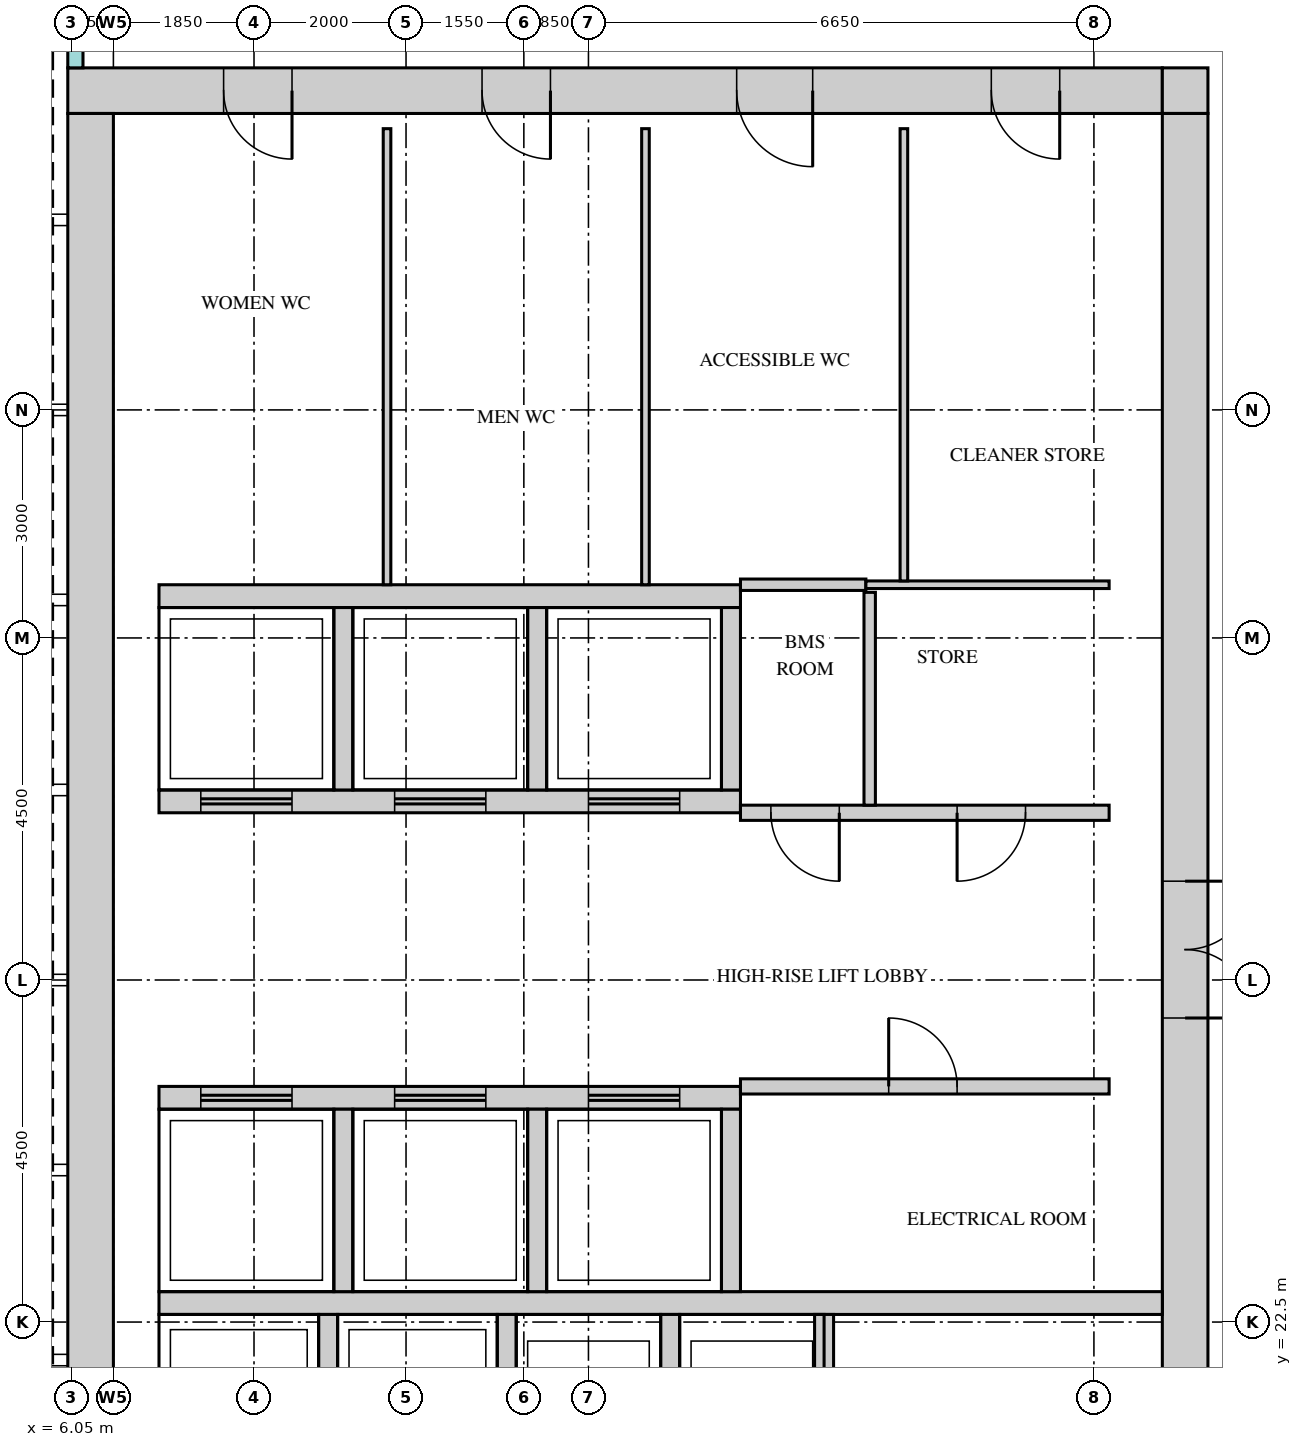
"""IFC4 building model, lengths in metres.
Left out: names, types, materials, properties, quantities, classifications, styles, units other than length and angle.
Written with IfcOpenShell. Run it as: python <this file> out.ifc"""

import sys

from ifc_helpers import new_model, si_unit, direction, frame, frame_2d, origin, place, context, subcontext, project, spatial, rectangle, extrude, source, transform, mapped, element, fill, save


model = new_model("IFC4")
c1 = context("Model", 3, precision=1e-05, world=origin(), true_north=direction((0.0, 1.0)))
c2 = subcontext(c1, "Body", "Model", "MODEL_VIEW")
j1 = project(units=[si_unit("LENGTHUNIT", "METRE"), si_unit("PLANEANGLEUNIT", "RADIAN")], contexts=[c1])
p1 = place(None, origin())
s1 = spatial("IfcSite", under=j1, at=p1, CompositionType="ELEMENT")
p2 = place(p1, origin())
s2 = spatial("IfcBuilding", under=s1, at=p2, CompositionType="ELEMENT")
p3 = place(p2, frame((0.0, 0.0, 318.2)))
s3 = spatial("IfcBuildingStorey", under=s2, at=p3, CompositionType="ELEMENT", Elevation=318.2)
m1 = source(origin(), c2, "Body", "SweptSolid", [
    extrude(rectangle(XDim=14.4, YDim=0.6, at=frame_2d((7.2, 0.0))), origin(), (0.0, 0.0, 1.0), 3.75),
])
p4 = place(p3, frame((6.0, 38.7, 0.0), z_axis=(0.0, 0.0, 1.0), x_axis=(1.0, 0.0, 0.0)))
e1 = element("IfcWall", 1, at=p4, inside=s3, PredefinedType="SHEAR", context=c2, shape_type="MappedRepresentation", body=[
    mapped(m1, transform((0.0, 0.0, 0.0))),
])
m2 = source(origin(), c2, "Body", "SweptSolid", [
    extrude(rectangle(XDim=0.9, YDim=2.1, at=frame_2d((0.45, 1.05))), frame((0.0, 0.31, 0.0), z_axis=(0.0, -1.0, 0.0), x_axis=(1.0, 0.0, 0.0)), (0.0, 0.0, 1.0), 0.62),
])
p5 = place(p4, frame((2.05, 0.0, 0.0)))
e2 = element("IfcOpeningElement", 2, at=p5, cuts=e1, PredefinedType="OPENING", context=c2, shape_type="MappedRepresentation", body=[
    mapped(m2, transform((0.0, 0.0, 0.0))),
])
p6 = place(p4, frame((5.45, 0.0, 0.0)))
e3 = element("IfcOpeningElement", 3, at=p6, cuts=e1, PredefinedType="OPENING", context=c2, shape_type="MappedRepresentation", body=[
    mapped(m2, transform((0.0, 0.0, 0.0))),
])
m3 = source(origin(), c2, "Body", "SweptSolid", [
    extrude(rectangle(XDim=1.0, YDim=2.1, at=frame_2d((0.5, 1.05))), frame((0.0, 0.31, 0.0), z_axis=(0.0, -1.0, 0.0), x_axis=(1.0, 0.0, 0.0)), (0.0, 0.0, 1.0), 0.62),
])
p7 = place(p4, frame((8.8, 0.0, 0.0)))
e4 = element("IfcOpeningElement", 4, at=p7, cuts=e1, PredefinedType="OPENING", context=c2, shape_type="MappedRepresentation", body=[
    mapped(m3, transform((0.0, 0.0, 0.0))),
])
p8 = place(p4, frame((12.15, 0.0, 0.0)))
e5 = element("IfcOpeningElement", 5, at=p8, cuts=e1, PredefinedType="OPENING", context=c2, shape_type="MappedRepresentation", body=[
    mapped(m2, transform((0.0, 0.0, 0.0))),
])
m4 = source(origin(), c2, "Body", "SweptSolid", [
    extrude(rectangle(XDim=0.6, YDim=0.6, at=frame_2d((0.3, 0.0))), origin(), (0.0, 0.0, 1.0), 3.75),
])
p9 = place(p3, frame((20.4, 38.7, 0.0), z_axis=(0.0, 0.0, 1.0), x_axis=(1.0, 0.0, 0.0)))
e6 = element("IfcWall", 6, at=p9, inside=s3, PredefinedType="SHEAR", context=c2, shape_type="MappedRepresentation", body=[
    mapped(m4, transform((0.0, 0.0, 0.0))),
])
m5 = source(origin(), c2, "Body", "SweptSolid", [
    extrude(rectangle(XDim=22.8, YDim=0.6, at=frame_2d((11.4, 0.0))), origin(), (0.0, 0.0, 1.0), 3.75),
])
p10 = place(p3, frame((20.7, 15.6, 0.0), z_axis=(0.0, 0.0, 1.0), x_axis=(0.0, 1.0, 0.0)))
e7 = element("IfcWall", 7, at=p10, inside=s3, PredefinedType="SHEAR", context=c2, shape_type="MappedRepresentation", body=[
    mapped(m5, transform((0.0, 0.0, 0.0))),
])
m6 = source(origin(), c2, "Body", "SweptSolid", [
    extrude(rectangle(XDim=1.8, YDim=2.1, at=frame_2d((0.9, 1.05))), frame((0.0, 0.31, 0.0), z_axis=(0.0, -1.0, 0.0), x_axis=(1.0, 0.0, 0.0)), (0.0, 0.0, 1.0), 0.62),
])
p11 = place(p10, frame((10.9, 0.0, 0.0)))
e8 = element("IfcOpeningElement", 8, at=p11, cuts=e7, PredefinedType="OPENING", context=c2, shape_type="MappedRepresentation", body=[
    mapped(m6, transform((0.0, 0.0, 0.0))),
])
p12 = place(p10, frame((0.55, 0.0, 0.0)))
e9 = element("IfcOpeningElement", 9, at=p12, cuts=e7, PredefinedType="OPENING", context=c2, shape_type="MappedRepresentation", body=[
    mapped(m2, transform((0.0, 0.0, 0.0))),
])
p13 = place(p10, frame((4.1, 0.0, 0.0)))
e10 = element("IfcOpeningElement", 10, at=p13, cuts=e7, PredefinedType="OPENING", context=c2, shape_type="MappedRepresentation", body=[
    mapped(m2, transform((0.0, 0.0, 0.0))),
])
p14 = place(p3, frame((6.3, 15.6, 0.0), z_axis=(0.0, 0.0, 1.0), x_axis=(0.0, 1.0, 0.0)))
e11 = element("IfcWall", 11, at=p14, inside=s3, PredefinedType="SHEAR", context=c2, shape_type="MappedRepresentation", body=[
    mapped(m5, transform((0.0, 0.0, 0.0))),
])
m7 = source(origin(), c2, "Body", "SweptSolid", [
    extrude(rectangle(XDim=13.2, YDim=0.3, at=frame_2d((6.6, 0.0))), origin(), (0.0, 0.0, 1.0), 3.75),
])
p15 = place(p3, frame((7.2, 22.75, 0.0), z_axis=(0.0, 0.0, 1.0), x_axis=(1.0, 0.0, 0.0)))
e12 = element("IfcWall", 12, at=p15, inside=s3, PredefinedType="STANDARD", context=c2, shape_type="MappedRepresentation", body=[
    mapped(m7, transform((0.0, 0.0, 0.0))),
])
m8 = source(origin(), c2, "Body", "SweptSolid", [
    extrude(rectangle(XDim=7.65, YDim=0.3, at=frame_2d((3.825, 0.0))), origin(), (0.0, 0.0, 1.0), 3.75),
])
p16 = place(p3, frame((7.2, 32.05, 0.0), z_axis=(0.0, 0.0, 1.0), x_axis=(1.0, 0.0, 0.0)))
e13 = element("IfcWall", 13, at=p16, inside=s3, PredefinedType="STANDARD", context=c2, shape_type="MappedRepresentation", body=[
    mapped(m8, transform((0.0, 0.0, 0.0))),
])
p17 = place(p3, frame((7.2, 29.35, 0.0), z_axis=(0.0, 0.0, 1.0), x_axis=(1.0, 0.0, 0.0)))
e14 = element("IfcWall", 14, at=p17, inside=s3, PredefinedType="STANDARD", context=c2, shape_type="MappedRepresentation", body=[
    mapped(m8, transform((0.0, 0.0, 0.0))),
])
m9 = source(origin(), c2, "Body", "SweptSolid", [
    extrude(rectangle(XDim=1.2, YDim=2.1, at=frame_2d((0.6, 1.05))), frame((0.0, 0.16, 0.0), z_axis=(0.0, -1.0, 0.0), x_axis=(1.0, 0.0, 0.0)), (0.0, 0.0, 1.0), 0.32),
])
p18 = place(p17, frame((0.55, 0.0, 0.0)))
e15 = element("IfcOpeningElement", 15, at=p18, cuts=e14, PredefinedType="OPENING", context=c2, shape_type="MappedRepresentation", body=[
    mapped(m9, transform((0.0, 0.0, 0.0))),
])
p19 = place(p17, frame((3.1, 0.0, 0.0)))
e16 = element("IfcOpeningElement", 16, at=p19, cuts=e14, PredefinedType="OPENING", context=c2, shape_type="MappedRepresentation", body=[
    mapped(m9, transform((0.0, 0.0, 0.0))),
])
p20 = place(p17, frame((5.65, 0.0, 0.0)))
e17 = element("IfcOpeningElement", 17, at=p20, cuts=e14, PredefinedType="OPENING", context=c2, shape_type="MappedRepresentation", body=[
    mapped(m9, transform((0.0, 0.0, 0.0))),
])
p21 = place(p3, frame((7.2, 25.45, 0.0), z_axis=(0.0, 0.0, 1.0), x_axis=(1.0, 0.0, 0.0)))
e18 = element("IfcWall", 18, at=p21, inside=s3, PredefinedType="STANDARD", context=c2, shape_type="MappedRepresentation", body=[
    mapped(m8, transform((0.0, 0.0, 0.0))),
])
p22 = place(p21, frame((0.55, 0.0, 0.0)))
e19 = element("IfcOpeningElement", 19, at=p22, cuts=e18, PredefinedType="OPENING", context=c2, shape_type="MappedRepresentation", body=[
    mapped(m9, transform((0.0, 0.0, 0.0))),
])
p23 = place(p21, frame((3.1, 0.0, 0.0)))
e20 = element("IfcOpeningElement", 20, at=p23, cuts=e18, PredefinedType="OPENING", context=c2, shape_type="MappedRepresentation", body=[
    mapped(m9, transform((0.0, 0.0, 0.0))),
])
p24 = place(p21, frame((5.65, 0.0, 0.0)))
e21 = element("IfcOpeningElement", 21, at=p24, cuts=e18, PredefinedType="OPENING", context=c2, shape_type="MappedRepresentation", body=[
    mapped(m9, transform((0.0, 0.0, 0.0))),
])
m10 = source(origin(), c2, "Body", "SweptSolid", [
    extrude(rectangle(XDim=3.1, YDim=0.25, at=frame_2d((1.55, 0.0))), origin(), (0.0, 0.0, 1.0), 3.75),
])
for number, where, z_axis, x_axis in (
    (22, (9.425, 19.5, 0.0), (0.0, 0.0, 1.0), (0.0, 1.0, 0.0)),
    (23, (11.775, 19.5, 0.0), (0.0, 0.0, 1.0), (0.0, 1.0, 0.0)),
    (24, (13.925, 19.5, 0.0), (0.0, 0.0, 1.0), (0.0, 1.0, 0.0)),
    (25, (15.95, 19.5, 0.0), (0.0, 0.0, 1.0), (0.0, 1.0, 0.0)),
):
    element("IfcWall", number, at=place(p3, frame(where, z_axis=z_axis, x_axis=x_axis)), inside=s3, PredefinedType="STANDARD", context=c2, shape_type="MappedRepresentation", body=[
        mapped(m10, transform((0.0, 0.0, 0.0))),
    ])
m11 = source(origin(), c2, "Body", "SweptSolid", [
    extrude(rectangle(XDim=2.4, YDim=0.25, at=frame_2d((1.2, 0.0))), origin(), (0.0, 0.0, 1.0), 3.75),
])
for number, where, z_axis, x_axis in (
    (26, (9.625, 29.5, 0.0), (0.0, 0.0, 1.0), (0.0, 1.0, 0.0)),
    (27, (12.175, 29.5, 0.0), (0.0, 0.0, 1.0), (0.0, 1.0, 0.0)),
    (28, (14.725, 29.5, 0.0), (0.0, 0.0, 1.0), (0.0, 1.0, 0.0)),
):
    element("IfcWall", number, at=place(p3, frame(where, z_axis=z_axis, x_axis=x_axis)), inside=s3, PredefinedType="STANDARD", context=c2, shape_type="MappedRepresentation", body=[
        mapped(m11, transform((0.0, 0.0, 0.0))),
    ])
m12 = source(origin(), c2, "Body", "SweptSolid", [
    extrude(rectangle(XDim=2.4, YDim=0.25, at=frame_2d((1.2, 0.0))), origin(), (0.0, 0.0, 1.0), 3.75),
])
for number, where, z_axis, x_axis in (
    (29, (9.625, 22.9, 0.0), (0.0, 0.0, 1.0), (0.0, 1.0, 0.0)),
    (30, (12.175, 22.9, 0.0), (0.0, 0.0, 1.0), (0.0, 1.0, 0.0)),
    (31, (14.725, 22.9, 0.0), (0.0, 0.0, 1.0), (0.0, 1.0, 0.0)),
):
    element("IfcWall", number, at=place(p3, frame(where, z_axis=z_axis, x_axis=x_axis)), inside=s3, PredefinedType="STANDARD", context=c2, shape_type="MappedRepresentation", body=[
        mapped(m12, transform((0.0, 0.0, 0.0))),
    ])
m13 = source(origin(), c2, "Body", "SweptSolid", [
    extrude(rectangle(XDim=4.85, YDim=0.2, at=frame_2d((2.425, 0.0))), origin(), (0.0, 0.0, 1.0), 3.8),
])
p25 = place(p3, frame((14.85, 25.6, 0.0), z_axis=(0.0, 0.0, 1.0), x_axis=(1.0, 0.0, 0.0)))
e32 = element("IfcWall", 32, at=p25, inside=s3, PredefinedType="PARTITIONING", context=c2, shape_type="MappedRepresentation", body=[
    mapped(m13, transform((0.0, 0.0, 0.0))),
])
m14 = source(origin(), c2, "Body", "SweptSolid", [
    extrude(rectangle(XDim=0.9, YDim=2.1, at=frame_2d((0.45, 1.05))), frame((0.0, 0.11, 0.0), z_axis=(0.0, -1.0, 0.0), x_axis=(1.0, 0.0, 0.0)), (0.0, 0.0, 1.0), 0.22),
])
p26 = place(p25, frame((1.95, 0.0, 0.0)))
e33 = element("IfcOpeningElement", 33, at=p26, cuts=e32, PredefinedType="OPENING", context=c2, shape_type="MappedRepresentation", body=[
    mapped(m14, transform((0.0, 0.0, 0.0))),
])
p27 = place(p3, frame((14.85, 29.2, 0.0), z_axis=(0.0, 0.0, 1.0), x_axis=(1.0, 0.0, 0.0)))
e34 = element("IfcWall", 34, at=p27, inside=s3, PredefinedType="PARTITIONING", context=c2, shape_type="MappedRepresentation", body=[
    mapped(m13, transform((0.0, 0.0, 0.0))),
])
p28 = place(p27, frame((0.4, 0.0, 0.0)))
e35 = element("IfcOpeningElement", 35, at=p28, cuts=e34, PredefinedType="OPENING", context=c2, shape_type="MappedRepresentation", body=[
    mapped(m14, transform((0.0, 0.0, 0.0))),
])
p29 = place(p27, frame((2.85, 0.0, 0.0)))
e36 = element("IfcOpeningElement", 36, at=p29, cuts=e34, PredefinedType="OPENING", context=c2, shape_type="MappedRepresentation", body=[
    mapped(m14, transform((0.0, 0.0, 0.0))),
])
m15 = source(origin(), c2, "Body", "SweptSolid", [
    extrude(rectangle(XDim=2.8, YDim=0.15, at=frame_2d((1.4, 0.0))), origin(), (0.0, 0.0, 1.0), 3.8),
])
p30 = place(p3, frame((16.55, 29.3, 0.0), z_axis=(0.0, 0.0, 1.0), x_axis=(0.0, 1.0, 0.0)))
e37 = element("IfcWall", 37, at=p30, inside=s3, PredefinedType="PARTITIONING", context=c2, shape_type="MappedRepresentation", body=[
    mapped(m15, transform((0.0, 0.0, 0.0))),
])
m16 = source(origin(), c2, "Body", "SweptSolid", [
    extrude(rectangle(XDim=6.0, YDim=0.1, at=frame_2d((3.0, 0.0))), origin(), (0.0, 0.0, 1.0), 3.8),
])
for number, where, z_axis, x_axis in (
    (38, (10.2, 32.2, 0.0), (0.0, 0.0, 1.0), (0.0, 1.0, 0.0)),
    (39, (13.6, 32.2, 0.0), (0.0, 0.0, 1.0), (0.0, 1.0, 0.0)),
):
    element("IfcWall", number, at=place(p3, frame(where, z_axis=z_axis, x_axis=x_axis)), inside=s3, PredefinedType="PARTITIONING", context=c2, shape_type="MappedRepresentation", body=[
        mapped(m16, transform((0.0, 0.0, 0.0))),
    ])
m17 = source(origin(), c2, "Body", "SweptSolid", [
    extrude(rectangle(XDim=1.65, YDim=0.15, at=frame_2d((0.825, 0.0))), origin(), (0.0, 0.0, 1.0), 3.8),
])
p31 = place(p3, frame((14.85, 32.2, 0.0), z_axis=(0.0, 0.0, 1.0), x_axis=(1.0, 0.0, 0.0)))
e40 = element("IfcWall", 40, at=p31, inside=s3, PredefinedType="PARTITIONING", context=c2, shape_type="MappedRepresentation", body=[
    mapped(m17, transform((0.0, 0.0, 0.0))),
])
m18 = source(origin(), c2, "Body", "SweptSolid", [
    extrude(rectangle(XDim=3.2, YDim=0.1, at=frame_2d((1.6, 0.0))), origin(), (0.0, 0.0, 1.0), 3.8),
])
p32 = place(p3, frame((16.5, 32.2, 0.0), z_axis=(0.0, 0.0, 1.0), x_axis=(1.0, 0.0, 0.0)))
e41 = element("IfcWall", 41, at=p32, inside=s3, PredefinedType="PARTITIONING", context=c2, shape_type="MappedRepresentation", body=[
    mapped(m18, transform((0.0, 0.0, 0.0))),
])
m19 = source(origin(), c2, "Body", "SweptSolid", [
    extrude(rectangle(XDim=5.95, YDim=0.1, at=frame_2d((2.975, 0.0))), origin(), (0.0, 0.0, 1.0), 3.8),
])
p33 = place(p3, frame((17.0, 32.25, 0.0), z_axis=(0.0, 0.0, 1.0), x_axis=(0.0, 1.0, 0.0)))
e42 = element("IfcWall", 42, at=p33, inside=s3, PredefinedType="PARTITIONING", context=c2, shape_type="MappedRepresentation", body=[
    mapped(m19, transform((0.0, 0.0, 0.0))),
])
m20 = source(origin(), c2, "Body", "SweptSolid", [
    extrude(rectangle(XDim=0.9, YDim=2.1, at=frame_2d((0.45, 1.05))), frame((0.0, 0.025, 0.0), z_axis=(0.0, -1.0, 0.0), x_axis=(1.0, 0.0, 0.0)), (0.0, 0.0, 1.0), 0.05),
])
p34 = place(p26, origin())
e43 = element("IfcDoor", 43, at=p34, inside=s3, OperationType="SINGLE_SWING_RIGHT", PredefinedType="DOOR", context=c2, shape_type="MappedRepresentation", body=[
    mapped(m20, transform((0.0, 0.0, 0.0))),
])
fill(e33, e43)
p35 = place(p28, origin())
e44 = element("IfcDoor", 44, at=p35, inside=s3, OperationType="SINGLE_SWING_RIGHT", PredefinedType="DOOR", context=c2, shape_type="MappedRepresentation", body=[
    mapped(m20, transform((0.0, 0.0, 0.0))),
])
fill(e35, e44)
p36 = place(p29, origin())
e45 = element("IfcDoor", 45, at=p36, inside=s3, OperationType="SINGLE_SWING_LEFT", PredefinedType="DOOR", context=c2, shape_type="MappedRepresentation", body=[
    mapped(m20, transform((0.0, 0.0, 0.0))),
])
fill(e36, e45)
m21 = source(origin(), c2, "Body", "SweptSolid", [
    extrude(rectangle(XDim=1.8, YDim=2.1, at=frame_2d((0.9, 1.05))), frame((0.0, 0.25, 0.0), z_axis=(0.0, -1.0, 0.0), x_axis=(1.0, 0.0, 0.0)), (0.0, 0.0, 1.0), 0.5),
])
p37 = place(p11, origin())
e46 = element("IfcDoor", 46, at=p37, inside=s3, OperationType="DOUBLE_DOOR_SINGLE_SWING", PredefinedType="DOOR", context=c2, shape_type="MappedRepresentation", body=[
    mapped(m21, transform((0.0, 0.0, 0.0))),
])
fill(e8, e46)
m22 = source(origin(), c2, "Body", "SweptSolid", [
    extrude(rectangle(XDim=0.9, YDim=2.1, at=frame_2d((0.45, 1.05))), frame((0.0, 0.25, 0.0), z_axis=(0.0, -1.0, 0.0), x_axis=(1.0, 0.0, 0.0)), (0.0, 0.0, 1.0), 0.5),
])
p38 = place(p5, origin())
e47 = element("IfcDoor", 47, at=p38, inside=s3, OperationType="SINGLE_SWING_RIGHT", PredefinedType="DOOR", context=c2, shape_type="MappedRepresentation", body=[
    mapped(m22, transform((0.0, 0.0, 0.0))),
])
fill(e2, e47)
p39 = place(p6, origin())
e48 = element("IfcDoor", 48, at=p39, inside=s3, OperationType="SINGLE_SWING_RIGHT", PredefinedType="DOOR", context=c2, shape_type="MappedRepresentation", body=[
    mapped(m22, transform((0.0, 0.0, 0.0))),
])
fill(e3, e48)
m23 = source(origin(), c2, "Body", "SweptSolid", [
    extrude(rectangle(XDim=1.0, YDim=2.1, at=frame_2d((0.5, 1.05))), frame((0.0, 0.25, 0.0), z_axis=(0.0, -1.0, 0.0), x_axis=(1.0, 0.0, 0.0)), (0.0, 0.0, 1.0), 0.5),
])
p40 = place(p7, origin())
e49 = element("IfcDoor", 49, at=p40, inside=s3, OperationType="SINGLE_SWING_RIGHT", PredefinedType="DOOR", context=c2, shape_type="MappedRepresentation", body=[
    mapped(m23, transform((0.0, 0.0, 0.0))),
])
fill(e4, e49)
p41 = place(p8, origin())
e50 = element("IfcDoor", 50, at=p41, inside=s3, OperationType="SINGLE_SWING_RIGHT", PredefinedType="DOOR", context=c2, shape_type="MappedRepresentation", body=[
    mapped(m22, transform((0.0, 0.0, 0.0))),
])
fill(e5, e50)
m24 = source(origin(), c2, "Body", "SweptSolid", [
    extrude(rectangle(XDim=1.2, YDim=2.1, at=frame_2d((0.6, 1.05))), frame((0.0, 0.025, 0.0), z_axis=(0.0, -1.0, 0.0), x_axis=(1.0, 0.0, 0.0)), (0.0, 0.0, 1.0), 0.05),
])
p42 = place(p22, origin())
e51 = element("IfcDoor", 51, at=p42, inside=s3, OperationType="DOUBLE_DOOR_SLIDING", PredefinedType="DOOR", context=c2, shape_type="MappedRepresentation", body=[
    mapped(m24, transform((0.0, 0.0, 0.0))),
])
fill(e19, e51)
p43 = place(p23, origin())
e52 = element("IfcDoor", 52, at=p43, inside=s3, OperationType="DOUBLE_DOOR_SLIDING", PredefinedType="DOOR", context=c2, shape_type="MappedRepresentation", body=[
    mapped(m24, transform((0.0, 0.0, 0.0))),
])
fill(e20, e52)
p44 = place(p24, origin())
e53 = element("IfcDoor", 53, at=p44, inside=s3, OperationType="DOUBLE_DOOR_SLIDING", PredefinedType="DOOR", context=c2, shape_type="MappedRepresentation", body=[
    mapped(m24, transform((0.0, 0.0, 0.0))),
])
fill(e21, e53)
p45 = place(p18, origin())
e54 = element("IfcDoor", 54, at=p45, inside=s3, OperationType="DOUBLE_DOOR_SLIDING", PredefinedType="DOOR", context=c2, shape_type="MappedRepresentation", body=[
    mapped(m24, transform((0.0, 0.0, 0.0))),
])
fill(e15, e54)
p46 = place(p19, origin())
e55 = element("IfcDoor", 55, at=p46, inside=s3, OperationType="DOUBLE_DOOR_SLIDING", PredefinedType="DOOR", context=c2, shape_type="MappedRepresentation", body=[
    mapped(m24, transform((0.0, 0.0, 0.0))),
])
fill(e16, e55)
p47 = place(p20, origin())
e56 = element("IfcDoor", 56, at=p47, inside=s3, OperationType="DOUBLE_DOOR_SLIDING", PredefinedType="DOOR", context=c2, shape_type="MappedRepresentation", body=[
    mapped(m24, transform((0.0, 0.0, 0.0))),
])
fill(e17, e56)
save(model, sys.argv[1])
